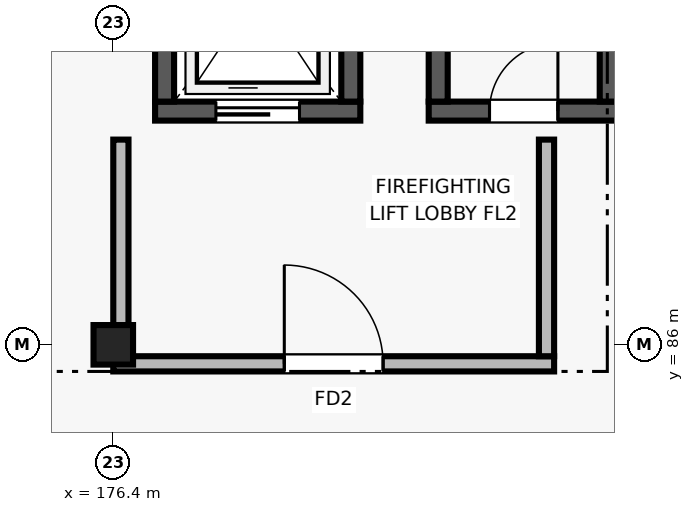
"""IFC4 building model, lengths in metres.
Left out: names, types, materials, properties, quantities, classifications, styles, units other than length and angle.
Written with IfcOpenShell. Run it as: python <this file> out.ifc"""

import sys

from ifc_helpers import new_model, si_unit, direction, frame, frame_2d, origin, origin_2d, place, context, subcontext, project, spatial, rectangle, extrude, element, fill, save


model = new_model("IFC4")
c1 = context("Model", 3, precision=1e-05, world=origin(), true_north=direction((0.0, 1.0)))
c2 = subcontext(c1, "Body", "Model", "MODEL_VIEW")
j1 = project(units=[si_unit("LENGTHUNIT", "METRE"), si_unit("PLANEANGLEUNIT", "RADIAN")], contexts=[c1])
p1 = place(None, origin())
s1 = spatial("IfcSite", under=j1, at=p1, CompositionType="ELEMENT")
p2 = place(p1, origin())
s2 = spatial("IfcBuilding", under=s1, at=p2, CompositionType="ELEMENT")
p3 = place(p2, frame((0.0, 0.0, 25.8)))
s3 = spatial("IfcBuildingStorey", under=s2, at=p3, CompositionType="ELEMENT", Elevation=25.8)
p4 = place(p3, frame((176.4, 86.0, 0.0), z_axis=(0.0, 0.0, 1.0), x_axis=(1.0, 0.0, 0.0)))
e1 = element("IfcColumn", 1, at=p4, inside=s3, PredefinedType="COLUMN", context=c2, shape_type="SweptSolid", body=[
    extrude(rectangle(XDim=0.52, YDim=0.52, at=origin_2d()), origin(), (0.0, 0.0, 1.0), 4.2),
])
p5 = place(p3, frame((176.95, 89.075, 0.0), z_axis=(0.0, 0.0, 1.0), x_axis=(1.0, 0.0, 0.0)))
e2 = element("IfcWall", 2, at=p5, inside=s3, PredefinedType="SHEAR", context=c2, shape_type="SweptSolid", body=[
    extrude(rectangle(XDim=2.7, YDim=0.25, at=frame_2d((1.35, 0.0))), origin(), (0.0, 0.0, 1.0), 3.92),
])
p6 = place(p5, frame((0.8, 0.0, 0.0)))
e3 = element("IfcOpeningElement", 3, at=p6, cuts=e2, PredefinedType="OPENING", context=c2, shape_type="SweptSolid", body=[
    extrude(rectangle(XDim=1.1, YDim=2.15, at=frame_2d((0.55, 1.075))), frame((0.0, 0.135, 0.0), z_axis=(0.0, -1.0, 0.0), x_axis=(1.0, 0.0, 0.0)), (0.0, 0.0, 1.0), 0.27),
])
for number, where, z_axis, x_axis in (
    (4, (177.075, 89.2, 0.0), (0.0, 0.0, 1.0), (0.0, 1.0, 0.0)),
    (5, (179.525, 89.2, 0.0), (0.0, 0.0, 1.0), (0.0, 1.0, 0.0)),
):
    element("IfcWall", number, at=place(p3, frame(where, z_axis=z_axis, x_axis=x_axis)), inside=s3, PredefinedType="SHEAR", context=c2, shape_type="SweptSolid", body=[
        extrude(rectangle(XDim=2.9, YDim=0.25, at=frame_2d((1.45, 0.0))), origin(), (0.0, 0.0, 1.0), 3.92),
    ])
p7 = place(p3, frame((176.4, 85.75, 0.0), z_axis=(0.0, 0.0, 1.0), x_axis=(1.0, 0.0, 0.0)))
e6 = element("IfcWall", 6, at=p7, inside=s3, PredefinedType="SOLIDWALL", context=c2, shape_type="SweptSolid", body=[
    extrude(rectangle(XDim=5.8, YDim=0.2, at=frame_2d((2.9, 0.0))), origin(), (0.0, 0.0, 1.0), 3.92),
])
p8 = place(p7, frame((2.25, 0.0, 0.0)))
e7 = element("IfcOpeningElement", 7, at=p8, cuts=e6, PredefinedType="OPENING", context=c2, shape_type="SweptSolid", body=[
    extrude(rectangle(XDim=1.3, YDim=2.2, at=frame_2d((0.65, 1.1))), frame((0.0, 0.11, 0.0), z_axis=(0.0, -1.0, 0.0), x_axis=(1.0, 0.0, 0.0)), (0.0, 0.0, 1.0), 0.22),
])
p9 = place(p3, frame((176.5, 85.85, 0.0), z_axis=(0.0, 0.0, 1.0), x_axis=(0.0, 1.0, 0.0)))
e8 = element("IfcWall", 8, at=p9, inside=s3, PredefinedType="SOLIDWALL", context=c2, shape_type="SweptSolid", body=[
    extrude(rectangle(XDim=2.85, YDim=0.2, at=frame_2d((1.425, 0.0))), origin(), (0.0, 0.0, 1.0), 3.355),
])
p10 = place(p3, frame((182.1, 85.85, 0.0), z_axis=(0.0, 0.0, 1.0), x_axis=(0.0, 1.0, 0.0)))
e9 = element("IfcWall", 9, at=p10, inside=s3, PredefinedType="SOLIDWALL", context=c2, shape_type="SweptSolid", body=[
    extrude(rectangle(XDim=2.85, YDim=0.2, at=frame_2d((1.425, 0.0))), origin(), (0.0, 0.0, 1.0), 3.92),
])
p11 = place(p3, frame((180.55, 89.075, 0.0), z_axis=(0.0, 0.0, 1.0), x_axis=(1.0, 0.0, 0.0)))
e10 = element("IfcWall", 10, at=p11, inside=s3, PredefinedType="SHEAR", context=c2, shape_type="SweptSolid", body=[
    extrude(rectangle(XDim=2.5, YDim=0.25, at=frame_2d((1.25, 0.0))), origin(), (0.0, 0.0, 1.0), 3.92),
])
p12 = place(p11, frame((0.8, 0.0, 0.0)))
e11 = element("IfcOpeningElement", 11, at=p12, cuts=e10, PredefinedType="OPENING", context=c2, shape_type="SweptSolid", body=[
    extrude(rectangle(XDim=0.9, YDim=2.05, at=frame_2d((0.45, 1.025))), frame((0.0, 0.135, 0.0), z_axis=(0.0, -1.0, 0.0), x_axis=(1.0, 0.0, 0.0)), (0.0, 0.0, 1.0), 0.27),
])
for number, where, z_axis, x_axis in (
    (12, (180.675, 89.2, 0.0), (0.0, 0.0, 1.0), (0.0, 1.0, 0.0)),
    (13, (182.925, 89.2, 0.0), (0.0, 0.0, 1.0), (0.0, 1.0, 0.0)),
):
    element("IfcWall", number, at=place(p3, frame(where, z_axis=z_axis, x_axis=x_axis)), inside=s3, PredefinedType="SHEAR", context=c2, shape_type="SweptSolid", body=[
        extrude(rectangle(XDim=2.9, YDim=0.25, at=frame_2d((1.45, 0.0))), origin(), (0.0, 0.0, 1.0), 3.92),
    ])
p13 = place(p8, origin())
e14 = element("IfcDoor", 14, at=p13, inside=s3, OperationType="SINGLE_SWING_LEFT", PredefinedType="DOOR", context=c2, shape_type="SweptSolid", body=[
    extrude(rectangle(XDim=1.3, YDim=2.2, at=frame_2d((0.65, 1.1))), frame((0.0, 0.025, 0.0), z_axis=(0.0, -1.0, 0.0), x_axis=(1.0, 0.0, 0.0)), (0.0, 0.0, 1.0), 0.05),
])
fill(e7, e14)
p14 = place(p12, origin())
e15 = element("IfcDoor", 15, at=p14, inside=s3, OperationType="SINGLE_SWING_RIGHT", PredefinedType="DOOR", context=c2, shape_type="SweptSolid", body=[
    extrude(rectangle(XDim=0.9, YDim=2.05, at=frame_2d((0.45, 1.025))), frame((0.0, 0.025, 0.0), z_axis=(0.0, -1.0, 0.0), x_axis=(1.0, 0.0, 0.0)), (0.0, 0.0, 1.0), 0.05),
])
fill(e11, e15)
p15 = place(p6, origin())
e16 = element("IfcDoor", 16, at=p15, inside=s3, OperationType="SLIDING_TO_LEFT", PredefinedType="DOOR", context=c2, shape_type="SweptSolid", body=[
    extrude(rectangle(XDim=1.1, YDim=2.15, at=frame_2d((0.55, 1.075))), frame((0.0, 0.025, 0.0), z_axis=(0.0, -1.0, 0.0), x_axis=(1.0, 0.0, 0.0)), (0.0, 0.0, 1.0), 0.05),
])
fill(e3, e16)
save(model, sys.argv[1])
